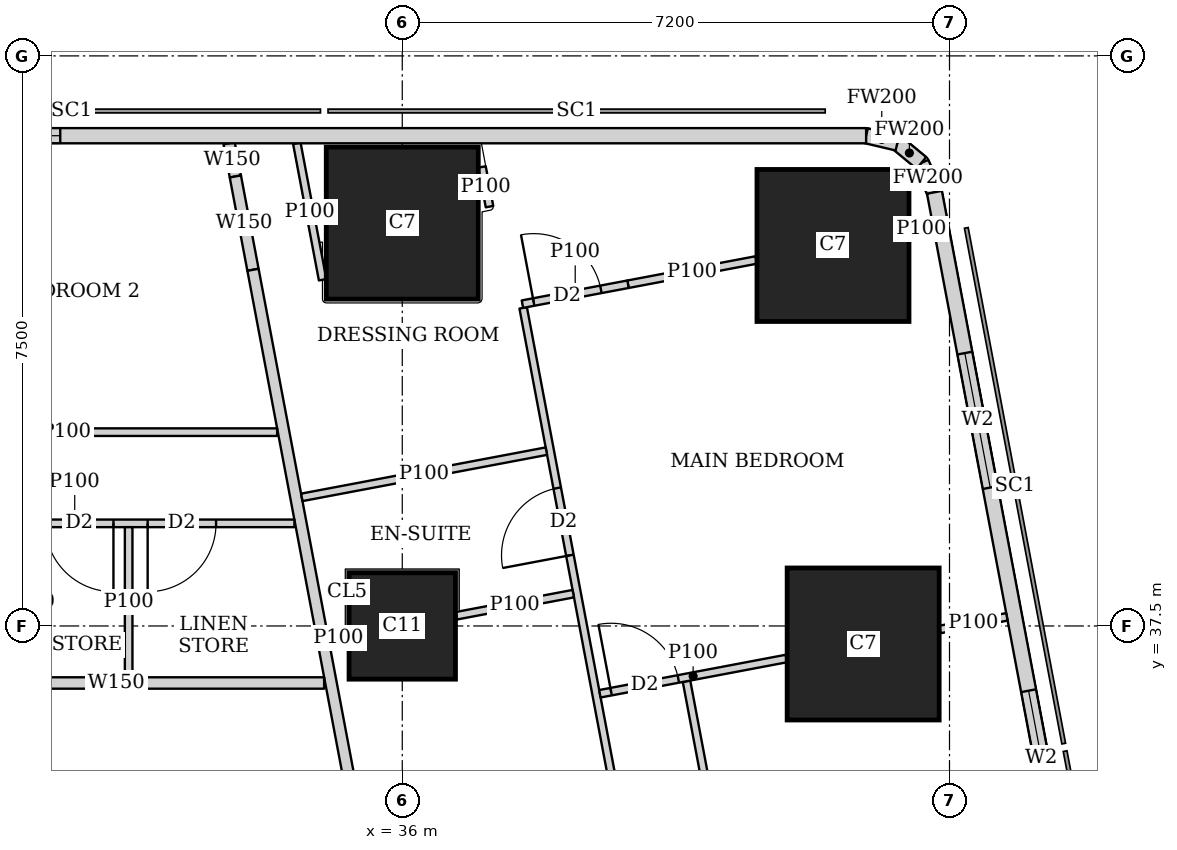
"""IFC4 building model, lengths in metres.
Left out: names, types, materials, properties, quantities, classifications, styles, units other than length and angle.
Written with IfcOpenShell. Run it as: python <this file> out.ifc"""

import sys

from ifc_helpers import new_model, si_unit, direction, frame, frame_2d, origin, origin_2d, place, context, subcontext, project, spatial, rectangle, extrude, element, fill, save


model = new_model("IFC4")
c1 = context("Model", 3, precision=1e-05, world=origin(), true_north=direction((0.0, 1.0)))
c2 = subcontext(c1, "Body", "Model", "MODEL_VIEW")
j1 = project(units=[si_unit("LENGTHUNIT", "METRE"), si_unit("PLANEANGLEUNIT", "RADIAN")], contexts=[c1])
p1 = place(None, origin())
s1 = spatial("IfcSite", under=j1, at=p1, CompositionType="ELEMENT")
p2 = place(p1, origin())
s2 = spatial("IfcBuilding", under=s1, at=p2, CompositionType="ELEMENT")
p3 = place(p2, frame((0.0, 0.0, 292.85)))
s3 = spatial("IfcBuildingStorey", under=s2, at=p3, CompositionType="ELEMENT", Elevation=292.85)
p4 = place(p3, frame((36.0, 37.5, 0.0), z_axis=(0.0, 0.0, 1.0), x_axis=(1.0, 0.0, 0.0)))
e1 = element("IfcColumn", 1, at=p4, inside=s3, PredefinedType="COLUMN", context=c2, shape_type="SweptSolid", body=[
    extrude(rectangle(XDim=1.4, YDim=1.4, at=origin_2d()), origin(), (0.0, 0.0, 1.0), 3.75),
])
for number, where, z_axis, x_axis in (
    (2, (42.064, 37.263, 0.0), (0.0, 0.0, 1.0), (1.0, 0.0, 0.0)),
    (3, (36.0, 42.8, 0.0), (0.0, 0.0, 1.0), (1.0, 0.0, 0.0)),
    (4, (41.667, 42.506, 0.0), (0.0, 0.0, 1.0), (1.0, 0.0, 0.0)),
):
    element("IfcColumn", number, at=place(p3, frame(where, z_axis=z_axis, x_axis=x_axis)), inside=s3, PredefinedType="COLUMN", context=c2, shape_type="SweptSolid", body=[
        extrude(rectangle(XDim=2.0, YDim=2.0, at=origin_2d()), origin(), (0.0, 0.0, 1.0), 3.75),
    ])
p5 = place(p3, frame((49.684, 7.832, 0.0), z_axis=(0.0, 0.0, 1.0), x_axis=(-0.185616669694, 0.982622232565, 0.0)))
e5 = element("IfcWall", 5, at=p5, inside=s3, PredefinedType="SOLIDWALL", context=c2, shape_type="SweptSolid", body=[
    extrude(rectangle(XDim=36.0, YDim=0.2, at=frame_2d((18.0, 0.0))), origin(), (0.0, 0.0, 1.0), 3.4),
])
p6 = place(p5, frame((2.518, 0.0, 0.9)))
e6 = element("IfcOpeningElement", 6, at=p6, cuts=e5, PredefinedType="OPENING", context=c2, shape_type="SweptSolid", body=[
    extrude(rectangle(XDim=2.4, YDim=1.5, at=frame_2d((1.2, 0.75))), frame((0.0, 0.11, 0.0), z_axis=(0.0, -1.0, 0.0), x_axis=(1.0, 0.0, 0.0)), (0.0, 0.0, 1.0), 0.22),
])
p7 = place(p5, frame((8.444, 0.0, 0.9)))
e7 = element("IfcOpeningElement", 7, at=p7, cuts=e5, PredefinedType="OPENING", context=c2, shape_type="SweptSolid", body=[
    extrude(rectangle(XDim=1.8, YDim=1.5, at=frame_2d((0.9, 0.75))), frame((0.0, 0.11, 0.0), z_axis=(0.0, -1.0, 0.0), x_axis=(1.0, 0.0, 0.0)), (0.0, 0.0, 1.0), 0.22),
])
p8 = place(p5, frame((12.261, 0.0, 0.9)))
e8 = element("IfcOpeningElement", 8, at=p8, cuts=e5, PredefinedType="OPENING", context=c2, shape_type="SweptSolid", body=[
    extrude(rectangle(XDim=1.8, YDim=1.5, at=frame_2d((0.9, 0.75))), frame((0.0, 0.11, 0.0), z_axis=(0.0, -1.0, 0.0), x_axis=(1.0, 0.0, 0.0)), (0.0, 0.0, 1.0), 0.22),
])
p9 = place(p5, frame((16.078, 0.0, 0.9)))
e9 = element("IfcOpeningElement", 9, at=p9, cuts=e5, PredefinedType="OPENING", context=c2, shape_type="SweptSolid", body=[
    extrude(rectangle(XDim=1.8, YDim=1.5, at=frame_2d((0.9, 0.75))), frame((0.0, 0.11, 0.0), z_axis=(0.0, -1.0, 0.0), x_axis=(1.0, 0.0, 0.0)), (0.0, 0.0, 1.0), 0.22),
])
p10 = place(p5, frame((19.894, 0.0, 0.9)))
e10 = element("IfcOpeningElement", 10, at=p10, cuts=e5, PredefinedType="OPENING", context=c2, shape_type="SweptSolid", body=[
    extrude(rectangle(XDim=1.8, YDim=1.5, at=frame_2d((0.9, 0.75))), frame((0.0, 0.11, 0.0), z_axis=(0.0, -1.0, 0.0), x_axis=(1.0, 0.0, 0.0)), (0.0, 0.0, 1.0), 0.22),
])
p11 = place(p5, frame((23.71, 0.0, 0.9)))
e11 = element("IfcOpeningElement", 11, at=p11, cuts=e5, PredefinedType="OPENING", context=c2, shape_type="SweptSolid", body=[
    extrude(rectangle(XDim=1.8, YDim=1.5, at=frame_2d((0.9, 0.75))), frame((0.0, 0.11, 0.0), z_axis=(0.0, -1.0, 0.0), x_axis=(1.0, 0.0, 0.0)), (0.0, 0.0, 1.0), 0.22),
])
p12 = place(p5, frame((27.526, 0.0, 0.9)))
e12 = element("IfcOpeningElement", 12, at=p12, cuts=e5, PredefinedType="OPENING", context=c2, shape_type="SweptSolid", body=[
    extrude(rectangle(XDim=1.8, YDim=1.5, at=frame_2d((0.9, 0.75))), frame((0.0, 0.11, 0.0), z_axis=(0.0, -1.0, 0.0), x_axis=(1.0, 0.0, 0.0)), (0.0, 0.0, 1.0), 0.22),
])
p13 = place(p5, frame((32.046, 0.0, 0.9)))
e13 = element("IfcOpeningElement", 13, at=p13, cuts=e5, PredefinedType="OPENING", context=c2, shape_type="SweptSolid", body=[
    extrude(rectangle(XDim=1.8, YDim=1.5, at=frame_2d((0.9, 0.75))), frame((0.0, 0.11, 0.0), z_axis=(0.0, -1.0, 0.0), x_axis=(1.0, 0.0, 0.0)), (0.0, 0.0, 1.0), 0.22),
])
p14 = place(p3, frame((43.002, 43.206, 0.0), z_axis=(0.0, 0.0, 1.0), x_axis=(-0.40678170573, 0.913525393124, 0.0)))
e14 = element("IfcWall", 14, at=p14, inside=s3, PredefinedType="SOLIDWALL", context=c2, shape_type="SweptSolid", body=[
    extrude(rectangle(XDim=0.423, YDim=0.2, at=frame_2d((0.211, 0.0))), origin(), (0.0, 0.0, 1.0), 3.4),
])
p15 = place(p3, frame((42.83, 43.592, 0.0), z_axis=(0.0, 0.0, 1.0), x_axis=(-0.771190539797, 0.636604391539, 0.0)))
e15 = element("IfcWall", 15, at=p15, inside=s3, PredefinedType="SOLIDWALL", context=c2, shape_type="SweptSolid", body=[
    extrude(rectangle(XDim=0.41, YDim=0.2, at=frame_2d((0.205, 0.0))), origin(), (0.0, 0.0, 1.0), 3.4),
])
p16 = place(p3, frame((42.514, 43.853, 0.0), z_axis=(0.0, 0.0, 1.0), x_axis=(-0.973288080424, 0.229587265555, 0.0)))
e16 = element("IfcWall", 16, at=p16, inside=s3, PredefinedType="SOLIDWALL", context=c2, shape_type="SweptSolid", body=[
    extrude(rectangle(XDim=0.422, YDim=0.2, at=frame_2d((0.211, 0.0))), origin(), (0.0, 0.0, 1.0), 3.4),
])
p17 = place(p3, frame((42.103, 43.95, 0.0), z_axis=(0.0, 0.0, 1.0), x_axis=(-1.0, 0.0, 0.0)))
e17 = element("IfcWall", 17, at=p17, inside=s3, PredefinedType="SOLIDWALL", context=c2, shape_type="SweptSolid", body=[
    extrude(rectangle(XDim=27.54, YDim=0.2, at=frame_2d((13.77, 0.0))), origin(), (0.0, 0.0, 1.0), 3.4),
])
p18 = place(p17, frame((10.603, 0.0, 0.9)))
e18 = element("IfcOpeningElement", 18, at=p18, cuts=e17, PredefinedType="OPENING", context=c2, shape_type="SweptSolid", body=[
    extrude(rectangle(XDim=1.8, YDim=1.5, at=frame_2d((0.9, 0.75))), frame((0.0, 0.11, 0.0), z_axis=(0.0, -1.0, 0.0), x_axis=(1.0, 0.0, 0.0)), (0.0, 0.0, 1.0), 0.22),
])
p19 = place(p17, frame((14.203, 0.0, 0.9)))
e19 = element("IfcOpeningElement", 19, at=p19, cuts=e17, PredefinedType="OPENING", context=c2, shape_type="SweptSolid", body=[
    extrude(rectangle(XDim=1.8, YDim=1.5, at=frame_2d((0.9, 0.75))), frame((0.0, 0.11, 0.0), z_axis=(0.0, -1.0, 0.0), x_axis=(1.0, 0.0, 0.0)), (0.0, 0.0, 1.0), 0.22),
])
p20 = place(p17, frame((17.803, 0.0, 0.9)))
e20 = element("IfcOpeningElement", 20, at=p20, cuts=e17, PredefinedType="OPENING", context=c2, shape_type="SweptSolid", body=[
    extrude(rectangle(XDim=1.8, YDim=1.5, at=frame_2d((0.9, 0.75))), frame((0.0, 0.11, 0.0), z_axis=(0.0, -1.0, 0.0), x_axis=(1.0, 0.0, 0.0)), (0.0, 0.0, 1.0), 0.22),
])
p21 = place(p17, frame((21.403, 0.0, 0.9)))
e21 = element("IfcOpeningElement", 21, at=p21, cuts=e17, PredefinedType="OPENING", context=c2, shape_type="SweptSolid", body=[
    extrude(rectangle(XDim=1.8, YDim=1.5, at=frame_2d((0.9, 0.75))), frame((0.0, 0.11, 0.0), z_axis=(0.0, -1.0, 0.0), x_axis=(1.0, 0.0, 0.0)), (0.0, 0.0, 1.0), 0.22),
])
p22 = place(p3, frame((29.501, 36.75, 0.0), z_axis=(0.0, 0.0, 1.0), x_axis=(1.0, 0.0, 0.0)))
e22 = element("IfcWall", 22, at=p22, inside=s3, PredefinedType="SOLIDWALL", context=c2, shape_type="SweptSolid", body=[
    extrude(rectangle(XDim=5.471, YDim=0.15, at=frame_2d((2.735, 0.0))), origin(), (0.0, 0.0, 1.0), 3.4),
])
p23 = place(p3, frame((33.722, 43.85, 0.0), z_axis=(0.0, 0.0, 1.0), x_axis=(0.184886516626, -0.982759877066, 0.0)))
e23 = element("IfcWall", 23, at=p23, inside=s3, PredefinedType="SOLIDWALL", context=c2, shape_type="SweptSolid", body=[
    extrude(rectangle(XDim=0.444, YDim=0.15, at=frame_2d((0.222, 0.0))), origin(), (0.0, 0.0, 1.0), 3.4),
])
p24 = place(p3, frame((33.804, 43.414, 0.0), z_axis=(0.0, 0.0, 1.0), x_axis=(0.185585816539, -0.982628060204, 0.0)))
e24 = element("IfcWall", 24, at=p24, inside=s3, PredefinedType="SOLIDWALL", context=c2, shape_type="SweptSolid", body=[
    extrude(rectangle(XDim=1.25, YDim=0.15, at=frame_2d((0.625, 0.0))), origin(), (0.0, 0.0, 1.0), 1.95),
])
p25 = place(p3, frame((34.036, 42.186, 0.0), z_axis=(0.0, 0.0, 1.0), x_axis=(0.185593518645, -0.9826266055, 0.0)))
e25 = element("IfcWall", 25, at=p25, inside=s3, PredefinedType="SOLIDWALL", context=c2, shape_type="SweptSolid", body=[
    extrude(rectangle(XDim=35.961, YDim=0.15, at=frame_2d((17.98, 0.0))), origin(), (0.0, 0.0, 1.0), 2.4),
])
p26 = place(p25, frame((19.345, 0.0, 0.0)))
e26 = element("IfcOpeningElement", 26, at=p26, cuts=e25, PredefinedType="OPENING", context=c2, shape_type="SweptSolid", body=[
    extrude(rectangle(XDim=1.0, YDim=2.1, at=frame_2d((0.5, 1.05))), frame((0.0, 0.085, 0.0), z_axis=(0.0, -1.0, 0.0), x_axis=(1.0, 0.0, 0.0)), (0.0, 0.0, 1.0), 0.17),
])
p27 = place(p25, frame((33.774, 0.0, 0.0)))
e27 = element("IfcOpeningElement", 27, at=p27, cuts=e25, PredefinedType="OPENING", context=c2, shape_type="SweptSolid", body=[
    extrude(rectangle(XDim=1.0, YDim=2.1, at=frame_2d((0.5, 1.05))), frame((0.0, 0.085, 0.0), z_axis=(0.0, -1.0, 0.0), x_axis=(1.0, 0.0, 0.0)), (0.0, 0.0, 1.0), 0.17),
])
p28 = place(p3, frame((34.952, 42.055, 0.0), z_axis=(0.0, 0.0, 1.0), x_axis=(-0.185490642006, 0.98264603074, 0.0)))
e28 = element("IfcWall", 28, at=p28, inside=s3, PredefinedType="PARTITIONING", context=c2, shape_type="SweptSolid", body=[
    extrude(rectangle(XDim=1.827, YDim=0.1, at=frame_2d((0.914, 0.0))), origin(), (0.0, 0.0, 1.0), 1.95),
])
p29 = place(p3, frame((37.049, 43.539, 0.0), z_axis=(0.0, 0.0, 1.0), x_axis=(0.186119495745, -0.982527115811, 0.0)))
e29 = element("IfcWall", 29, at=p29, inside=s3, PredefinedType="PARTITIONING", context=c2, shape_type="SweptSolid", body=[
    extrude(rectangle(XDim=0.531, YDim=0.1, at=frame_2d((0.266, 0.0))), origin(), (0.0, 0.0, 1.0), 1.95),
])
p30 = place(p3, frame((42.985, 42.755, 0.0), z_axis=(0.0, 0.0, 1.0), x_axis=(-0.98281924824, -0.184570651215, 0.0)))
e30 = element("IfcWall", 30, at=p30, inside=s3, PredefinedType="PARTITIONING", context=c2, shape_type="SweptSolid", body=[
    extrude(rectangle(XDim=0.313, YDim=0.1, at=frame_2d((0.157, 0.0))), origin(), (0.0, 0.0, 1.0), 3.4),
])
p31 = place(p3, frame((40.657, 42.315, 0.0), z_axis=(0.0, 0.0, 1.0), x_axis=(-0.982603924403, -0.185713563715, 0.0)))
e31 = element("IfcWall", 31, at=p31, inside=s3, PredefinedType="PARTITIONING", context=c2, shape_type="SweptSolid", body=[
    extrude(rectangle(XDim=1.717, YDim=0.1, at=frame_2d((0.858, 0.0))), origin(), (0.0, 0.0, 1.0), 1.95),
])
p32 = place(p3, frame((38.97, 41.996, 0.0), z_axis=(0.0, 0.0, 1.0), x_axis=(-0.982642648049, -0.185508561084, 0.0)))
e32 = element("IfcWall", 32, at=p32, inside=s3, PredefinedType="PARTITIONING", context=c2, shape_type="SweptSolid", body=[
    extrude(rectangle(XDim=1.413, YDim=0.1, at=frame_2d((0.707, 0.0))), origin(), (0.0, 0.0, 1.0), 3.4),
])
p33 = place(p32, frame((0.363, 0.0, 0.0)))
e33 = element("IfcOpeningElement", 33, at=p33, cuts=e32, PredefinedType="OPENING", context=c2, shape_type="SweptSolid", body=[
    extrude(rectangle(XDim=0.9, YDim=2.1, at=frame_2d((0.45, 1.05))), frame((0.0, 0.06, 0.0), z_axis=(0.0, -1.0, 0.0), x_axis=(1.0, 0.0, 0.0)), (0.0, 0.0, 1.0), 0.12),
])
p34 = place(p3, frame((43.955, 37.62, 0.0), z_axis=(0.0, 0.0, 1.0), x_axis=(-0.982708424405, -0.18515980288, 0.0)))
e34 = element("IfcWall", 34, at=p34, inside=s3, PredefinedType="PARTITIONING", context=c2, shape_type="SweptSolid", body=[
    extrude(rectangle(XDim=0.897, YDim=0.1, at=frame_2d((0.448, 0.0))), origin(), (0.0, 0.0, 1.0), 3.4),
])
p35 = place(p3, frame((41.054, 37.072, 0.0), z_axis=(0.0, 0.0, 1.0), x_axis=(-0.982579896219, -0.185840650951, 0.0)))
e35 = element("IfcWall", 35, at=p35, inside=s3, PredefinedType="PARTITIONING", context=c2, shape_type="SweptSolid", body=[
    extrude(rectangle(XDim=2.497, YDim=0.1, at=frame_2d((1.249, 0.0))), origin(), (0.0, 0.0, 1.0), 3.4),
])
p36 = place(p35, frame((1.447, 0.0, 0.0)))
e36 = element("IfcOpeningElement", 36, at=p36, cuts=e35, PredefinedType="OPENING", context=c2, shape_type="SweptSolid", body=[
    extrude(rectangle(XDim=0.9, YDim=2.1, at=frame_2d((0.45, 1.05))), frame((0.0, 0.06, 0.0), z_axis=(0.0, -1.0, 0.0), x_axis=(1.0, 0.0, 0.0)), (0.0, 0.0, 1.0), 0.12),
])
p37 = place(p3, frame((37.896, 39.8, 0.0), z_axis=(0.0, 0.0, 1.0), x_axis=(-0.982607026909, -0.185697147715, 0.0)))
e37 = element("IfcWall", 37, at=p37, inside=s3, PredefinedType="PARTITIONING", context=c2, shape_type="SweptSolid", body=[
    extrude(rectangle(XDim=3.275, YDim=0.1, at=frame_2d((1.637, 0.0))), origin(), (0.0, 0.0, 1.0), 3.4),
])
p38 = place(p3, frame((38.25, 37.925, 0.0), z_axis=(0.0, 0.0, 1.0), x_axis=(-0.982610209589, -0.185680305934, 0.0)))
e38 = element("IfcWall", 38, at=p38, inside=s3, PredefinedType="PARTITIONING", context=c2, shape_type="SweptSolid", body=[
    extrude(rectangle(XDim=1.567, YDim=0.1, at=frame_2d((0.784, 0.0))), origin(), (0.0, 0.0, 1.0), 3.4),
])
p39 = place(p3, frame((35.29, 37.366, 0.0), z_axis=(0.0, 0.0, 1.0), x_axis=(-0.982395465615, -0.18681313963, 0.0)))
e39 = element("IfcWall", 39, at=p39, inside=s3, PredefinedType="PARTITIONING", context=c2, shape_type="SweptSolid", body=[
    extrude(rectangle(XDim=0.263, YDim=0.1, at=frame_2d((0.131, 0.0))), origin(), (0.0, 0.0, 1.0), 3.4),
])
p40 = place(p3, frame((37.591, 41.685, 0.0), z_axis=(0.0, 0.0, 1.0), x_axis=(0.185541820726, -0.982636368532, 0.0)))
e40 = element("IfcWall", 40, at=p40, inside=s3, PredefinedType="PARTITIONING", context=c2, shape_type="SweptSolid", body=[
    extrude(rectangle(XDim=16.735, YDim=0.1, at=frame_2d((8.367, 0.0))), origin(), (0.0, 0.0, 1.0), 2.4),
])
p41 = place(p40, frame((2.413, 0.0, 0.0)))
e41 = element("IfcOpeningElement", 41, at=p41, cuts=e40, PredefinedType="OPENING", context=c2, shape_type="SweptSolid", body=[
    extrude(rectangle(XDim=0.9, YDim=2.1, at=frame_2d((0.45, 1.05))), frame((0.0, 0.06, 0.0), z_axis=(0.0, -1.0, 0.0), x_axis=(1.0, 0.0, 0.0)), (0.0, 0.0, 1.0), 0.12),
])
p42 = place(p40, frame((6.713, 0.0, 0.0)))
e42 = element("IfcOpeningElement", 42, at=p42, cuts=e40, PredefinedType="OPENING", context=c2, shape_type="SweptSolid", body=[
    extrude(rectangle(XDim=0.9, YDim=2.1, at=frame_2d((0.45, 1.05))), frame((0.0, 0.06, 0.0), z_axis=(0.0, -1.0, 0.0), x_axis=(1.0, 0.0, 0.0)), (0.0, 0.0, 1.0), 0.12),
])
p43 = place(p40, frame((9.805, 0.0, 0.0)))
e43 = element("IfcOpeningElement", 43, at=p43, cuts=e40, PredefinedType="OPENING", context=c2, shape_type="SweptSolid", body=[
    extrude(rectangle(XDim=0.9, YDim=2.1, at=frame_2d((0.45, 1.05))), frame((0.0, 0.06, 0.0), z_axis=(0.0, -1.0, 0.0), x_axis=(1.0, 0.0, 0.0)), (0.0, 0.0, 1.0), 0.12),
])
p44 = place(p40, frame((11.713, 0.0, 0.0)))
e44 = element("IfcOpeningElement", 44, at=p44, cuts=e40, PredefinedType="OPENING", context=c2, shape_type="SweptSolid", body=[
    extrude(rectangle(XDim=0.9, YDim=2.1, at=frame_2d((0.45, 1.05))), frame((0.0, 0.06, 0.0), z_axis=(0.0, -1.0, 0.0), x_axis=(1.0, 0.0, 0.0)), (0.0, 0.0, 1.0), 0.12),
])
p45 = place(p40, frame((14.426, 0.0, 0.0)))
e45 = element("IfcOpeningElement", 45, at=p45, cuts=e40, PredefinedType="OPENING", context=c2, shape_type="SweptSolid", body=[
    extrude(rectangle(XDim=0.9, YDim=2.1, at=frame_2d((0.45, 1.05))), frame((0.0, 0.06, 0.0), z_axis=(0.0, -1.0, 0.0), x_axis=(1.0, 0.0, 0.0)), (0.0, 0.0, 1.0), 0.12),
])
p46 = place(p3, frame((39.74, 36.773, 0.0), z_axis=(0.0, 0.0, 1.0), x_axis=(0.185583825641, -0.982628436216, 0.0)))
e46 = element("IfcWall", 46, at=p46, inside=s3, PredefinedType="PARTITIONING", context=c2, shape_type="SweptSolid", body=[
    extrude(rectangle(XDim=7.533, YDim=0.1, at=frame_2d((3.766, 0.0))), origin(), (0.0, 0.0, 1.0), 2.4),
])
p47 = place(p46, frame((2.726, 0.0, 0.0)))
e47 = element("IfcOpeningElement", 47, at=p47, cuts=e46, PredefinedType="OPENING", context=c2, shape_type="SweptSolid", body=[
    extrude(rectangle(XDim=0.9, YDim=2.1, at=frame_2d((0.45, 1.05))), frame((0.0, 0.06, 0.0), z_axis=(0.0, -1.0, 0.0), x_axis=(1.0, 0.0, 0.0)), (0.0, 0.0, 1.0), 0.12),
])
p48 = place(p46, frame((6.383, 0.0, 0.0)))
e48 = element("IfcOpeningElement", 48, at=p48, cuts=e46, PredefinedType="OPENING", context=c2, shape_type="SweptSolid", body=[
    extrude(rectangle(XDim=0.9, YDim=2.1, at=frame_2d((0.45, 1.05))), frame((0.0, 0.06, 0.0), z_axis=(0.0, -1.0, 0.0), x_axis=(1.0, 0.0, 0.0)), (0.0, 0.0, 1.0), 0.12),
])
p49 = place(p3, frame((32.4, 36.825, 0.0), z_axis=(0.0, 0.0, 1.0), x_axis=(0.0, 1.0, 0.0)))
e49 = element("IfcWall", 49, at=p49, inside=s3, PredefinedType="PARTITIONING", context=c2, shape_type="SweptSolid", body=[
    extrude(rectangle(XDim=1.975, YDim=0.1, at=frame_2d((0.988, 0.0))), origin(), (0.0, 0.0, 1.0), 3.4),
])
p50 = place(p3, frame((28.8, 38.85, 0.0), z_axis=(0.0, 0.0, 1.0), x_axis=(1.0, 0.0, 0.0)))
e50 = element("IfcWall", 50, at=p50, inside=s3, PredefinedType="PARTITIONING", context=c2, shape_type="SweptSolid", body=[
    extrude(rectangle(XDim=5.781, YDim=0.1, at=frame_2d((2.891, 0.0))), origin(), (0.0, 0.0, 1.0), 3.4),
])
p51 = place(p50, frame((0.75, 0.0, 0.0)))
e51 = element("IfcOpeningElement", 51, at=p51, cuts=e50, PredefinedType="OPENING", context=c2, shape_type="SweptSolid", body=[
    extrude(rectangle(XDim=0.9, YDim=2.1, at=frame_2d((0.45, 1.05))), frame((0.0, 0.06, 0.0), z_axis=(0.0, -1.0, 0.0), x_axis=(1.0, 0.0, 0.0)), (0.0, 0.0, 1.0), 0.12),
])
p52 = place(p50, frame((2.5, 0.0, 0.0)))
e52 = element("IfcOpeningElement", 52, at=p52, cuts=e50, PredefinedType="OPENING", context=c2, shape_type="SweptSolid", body=[
    extrude(rectangle(XDim=0.9, YDim=2.1, at=frame_2d((0.45, 1.05))), frame((0.0, 0.06, 0.0), z_axis=(0.0, -1.0, 0.0), x_axis=(1.0, 0.0, 0.0)), (0.0, 0.0, 1.0), 0.12),
])
p53 = place(p50, frame((3.85, 0.0, 0.0)))
e53 = element("IfcOpeningElement", 53, at=p53, cuts=e50, PredefinedType="OPENING", context=c2, shape_type="SweptSolid", body=[
    extrude(rectangle(XDim=0.9, YDim=2.1, at=frame_2d((0.45, 1.05))), frame((0.0, 0.06, 0.0), z_axis=(0.0, -1.0, 0.0), x_axis=(1.0, 0.0, 0.0)), (0.0, 0.0, 1.0), 0.12),
])
p54 = place(p3, frame((28.8, 40.05, 0.0), z_axis=(0.0, 0.0, 1.0), x_axis=(1.0, 0.0, 0.0)))
e54 = element("IfcWall", 54, at=p54, inside=s3, PredefinedType="PARTITIONING", context=c2, shape_type="SweptSolid", body=[
    extrude(rectangle(XDim=5.554, YDim=0.1, at=frame_2d((2.777, 0.0))), origin(), (0.0, 0.0, 1.0), 3.4),
])
p55 = place(p54, frame((0.3, 0.0, 0.0)))
e55 = element("IfcOpeningElement", 55, at=p55, cuts=e54, PredefinedType="OPENING", context=c2, shape_type="SweptSolid", body=[
    extrude(rectangle(XDim=0.9, YDim=2.1, at=frame_2d((0.45, 1.05))), frame((0.0, 0.06, 0.0), z_axis=(0.0, -1.0, 0.0), x_axis=(1.0, 0.0, 0.0)), (0.0, 0.0, 1.0), 0.12),
])
p56 = place(p12, origin())
e56 = element("IfcWindow", 56, at=p56, inside=s3, PartitioningType="SINGLE_PANEL", PredefinedType="WINDOW", context=c2, shape_type="SweptSolid", body=[
    extrude(rectangle(XDim=1.8, YDim=1.5, at=frame_2d((0.9, 0.75))), frame((0.0, 0.03, 0.0), z_axis=(0.0, -1.0, 0.0), x_axis=(1.0, 0.0, 0.0)), (0.0, 0.0, 1.0), 0.06),
])
fill(e12, e56)
p57 = place(p13, origin())
e57 = element("IfcWindow", 57, at=p57, inside=s3, PartitioningType="SINGLE_PANEL", PredefinedType="WINDOW", context=c2, shape_type="SweptSolid", body=[
    extrude(rectangle(XDim=1.8, YDim=1.5, at=frame_2d((0.9, 0.75))), frame((0.0, 0.03, 0.0), z_axis=(0.0, -1.0, 0.0), x_axis=(1.0, 0.0, 0.0)), (0.0, 0.0, 1.0), 0.06),
])
fill(e13, e57)
p58 = place(p18, origin())
e58 = element("IfcWindow", 58, at=p58, inside=s3, PartitioningType="SINGLE_PANEL", PredefinedType="WINDOW", context=c2, shape_type="SweptSolid", body=[
    extrude(rectangle(XDim=1.8, YDim=1.5, at=frame_2d((0.9, 0.75))), frame((0.0, 0.03, 0.0), z_axis=(0.0, -1.0, 0.0), x_axis=(1.0, 0.0, 0.0)), (0.0, 0.0, 1.0), 0.06),
])
fill(e18, e58)
p59 = place(p36, origin())
e59 = element("IfcDoor", 59, at=p59, inside=s3, OperationType="SINGLE_SWING_LEFT", PredefinedType="DOOR", context=c2, shape_type="SweptSolid", body=[
    extrude(rectangle(XDim=0.9, YDim=2.1, at=frame_2d((0.45, 1.05))), frame((0.0, 0.025, 0.0), z_axis=(0.0, -1.0, 0.0), x_axis=(1.0, 0.0, 0.0)), (0.0, 0.0, 1.0), 0.05),
])
fill(e36, e59)
p60 = place(p33, origin())
e60 = element("IfcDoor", 60, at=p60, inside=s3, OperationType="SINGLE_SWING_LEFT", PredefinedType="DOOR", context=c2, shape_type="SweptSolid", body=[
    extrude(rectangle(XDim=0.9, YDim=2.1, at=frame_2d((0.45, 1.05))), frame((0.0, 0.025, 0.0), z_axis=(0.0, -1.0, 0.0), x_axis=(1.0, 0.0, 0.0)), (0.0, 0.0, 1.0), 0.05),
])
fill(e33, e60)
p61 = place(p41, origin())
e61 = element("IfcDoor", 61, at=p61, inside=s3, OperationType="SINGLE_SWING_LEFT", PredefinedType="DOOR", context=c2, shape_type="SweptSolid", body=[
    extrude(rectangle(XDim=0.9, YDim=2.1, at=frame_2d((0.45, 1.05))), frame((0.0, 0.025, 0.0), z_axis=(0.0, -1.0, 0.0), x_axis=(1.0, 0.0, 0.0)), (0.0, 0.0, 1.0), 0.05),
])
fill(e41, e61)
p62 = place(p52, origin())
e62 = element("IfcDoor", 62, at=p62, inside=s3, OperationType="SINGLE_SWING_LEFT", PredefinedType="DOOR", context=c2, shape_type="SweptSolid", body=[
    extrude(rectangle(XDim=0.9, YDim=2.1, at=frame_2d((0.45, 1.05))), frame((0.0, 0.025, 0.0), z_axis=(0.0, -1.0, 0.0), x_axis=(1.0, 0.0, 0.0)), (0.0, 0.0, 1.0), 0.05),
])
fill(e52, e62)
p63 = place(p53, origin())
e63 = element("IfcDoor", 63, at=p63, inside=s3, OperationType="SINGLE_SWING_RIGHT", PredefinedType="DOOR", context=c2, shape_type="SweptSolid", body=[
    extrude(rectangle(XDim=0.9, YDim=2.1, at=frame_2d((0.45, 1.05))), frame((0.0, 0.025, 0.0), z_axis=(0.0, -1.0, 0.0), x_axis=(1.0, 0.0, 0.0)), (0.0, 0.0, 1.0), 0.05),
])
fill(e53, e63)
save(model, sys.argv[1])
